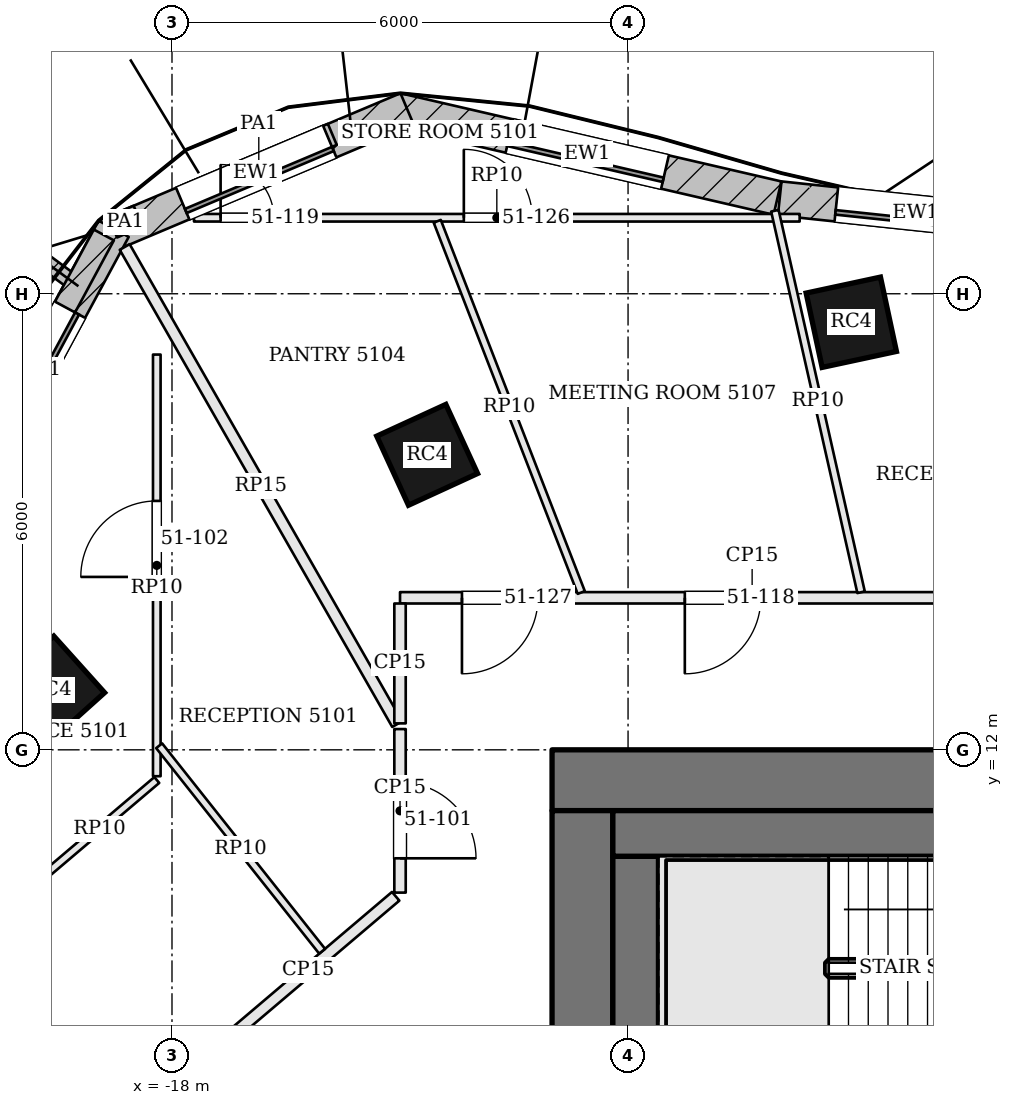
"""IFC4 building model, lengths in metres.
Left out: names, types, materials, properties, quantities, classifications, styles, units other than length and angle.
Written with IfcOpenShell. Run it as: python <this file> out.ifc"""

import sys

from ifc_helpers import new_model, si_unit, direction, frame, frame_2d, origin, origin_2d, place, context, subcontext, project, spatial, rectangle, extrude, element, fill, save


model = new_model("IFC4")
c1 = context("Model", 3, precision=1e-05, world=origin(), true_north=direction((0.0, 1.0)))
c2 = subcontext(c1, "Body", "Model", "MODEL_VIEW")
j1 = project(units=[si_unit("LENGTHUNIT", "METRE"), si_unit("PLANEANGLEUNIT", "RADIAN")], contexts=[c1])
p1 = place(None, origin())
s1 = spatial("IfcSite", under=j1, at=p1, CompositionType="ELEMENT")
p2 = place(p1, origin())
s2 = spatial("IfcBuilding", under=s1, at=p2, CompositionType="ELEMENT")
p3 = place(p2, frame((0.0, 0.0, 209.1)))
s3 = spatial("IfcBuildingStorey", under=s2, at=p3, CompositionType="ELEMENT", Elevation=209.1)
p4 = place(p3, frame((-13.0, 11.6, 0.0), z_axis=(0.0, 0.0, 1.0), x_axis=(1.0, 0.0, 0.0)))
e1 = element("IfcWall", 1, at=p4, inside=s3, PredefinedType="SHEAR", context=c2, shape_type="SweptSolid", body=[
    extrude(rectangle(XDim=26.0, YDim=0.8, at=frame_2d((13.0, 0.0))), origin(), (0.0, 0.0, 1.0), 3.9),
])
p5 = place(p4, frame((9.375, 0.0, 0.0)))
e2 = element("IfcOpeningElement", 2, at=p5, cuts=e1, PredefinedType="OPENING", context=c2, shape_type="SweptSolid", body=[
    extrude(rectangle(XDim=0.7, YDim=2.1, at=frame_2d((0.35, 1.05))), frame((0.0, 0.41, 0.0), z_axis=(0.0, -1.0, 0.0), x_axis=(1.0, 0.0, 0.0)), (0.0, 0.0, 1.0), 0.82),
])
p6 = place(p4, frame((12.075, 0.0, 0.0)))
e3 = element("IfcOpeningElement", 3, at=p6, cuts=e1, PredefinedType="OPENING", context=c2, shape_type="SweptSolid", body=[
    extrude(rectangle(XDim=1.0, YDim=2.1, at=frame_2d((0.5, 1.05))), frame((0.0, 0.41, 0.0), z_axis=(0.0, -1.0, 0.0), x_axis=(1.0, 0.0, 0.0)), (0.0, 0.0, 1.0), 0.82),
])
p7 = place(p4, frame((14.675, 0.0, 0.0)))
e4 = element("IfcOpeningElement", 4, at=p7, cuts=e1, PredefinedType="OPENING", context=c2, shape_type="SweptSolid", body=[
    extrude(rectangle(XDim=0.7, YDim=2.1, at=frame_2d((0.35, 1.05))), frame((0.0, 0.41, 0.0), z_axis=(0.0, -1.0, 0.0), x_axis=(1.0, 0.0, 0.0)), (0.0, 0.0, 1.0), 0.82),
])
p8 = place(p4, frame((16.625, 0.0, 0.0)))
e5 = element("IfcOpeningElement", 5, at=p8, cuts=e1, PredefinedType="OPENING", context=c2, shape_type="SweptSolid", body=[
    extrude(rectangle(XDim=0.9, YDim=2.1, at=frame_2d((0.45, 1.05))), frame((0.0, 0.41, 0.0), z_axis=(0.0, -1.0, 0.0), x_axis=(1.0, 0.0, 0.0)), (0.0, 0.0, 1.0), 0.82),
])
p9 = place(p3, frame((-12.6, -2.2, 0.0), z_axis=(0.0, 0.0, 1.0), x_axis=(0.0, 1.0, 0.0)))
e6 = element("IfcWall", 6, at=p9, inside=s3, PredefinedType="SHEAR", context=c2, shape_type="SweptSolid", body=[
    extrude(rectangle(XDim=13.4, YDim=0.8, at=frame_2d((6.7, 0.0))), origin(), (0.0, 0.0, 1.0), 3.9),
])
p10 = place(p9, frame((4.2, 0.0, 0.0)))
e7 = element("IfcOpeningElement", 7, at=p10, cuts=e6, PredefinedType="OPENING", context=c2, shape_type="SweptSolid", body=[
    extrude(rectangle(XDim=1.8, YDim=2.1, at=frame_2d((0.9, 1.05))), frame((0.0, 0.41, 0.0), z_axis=(0.0, -1.0, 0.0), x_axis=(1.0, 0.0, 0.0)), (0.0, 0.0, 1.0), 0.82),
])
for number, where, z_axis, x_axis in (
    (8, (-9.063, 17.625, 0.0), (0.0, 0.0, 1.0), (-0.978, -0.21, 0.0)),
    (9, (-14.643, 15.881, 0.0), (0.0, 0.0, 1.0), (-0.909, -0.417, 0.0)),
    (10, (-19.593, 12.79, 0.0), (0.0, 0.0, 1.0), (-0.744, -0.668, 0.0)),
):
    element("IfcColumn", number, at=place(p3, frame(where, z_axis=z_axis, x_axis=x_axis)), inside=s3, PredefinedType="COLUMN", context=c2, shape_type="SweptSolid", body=[
        extrude(rectangle(XDim=1.0, YDim=1.0, at=origin_2d()), origin(), (0.0, 0.0, 1.0), 3.9),
    ])
p11 = place(p3, frame((-6.427, 18.875, 0.0), z_axis=(0.0, 0.0, 1.0), x_axis=(-0.994433468803, 0.10536638992, 0.0)))
e11 = element("IfcWall", 11, at=p11, inside=s3, PredefinedType="SOLIDWALL", context=c2, shape_type="SweptSolid", body=[
    extrude(rectangle(XDim=3.598, YDim=0.45, at=frame_2d((1.799, 0.0))), origin(), (0.0, 0.0, 1.0), 3.7),
])
p12 = place(p11, frame((0.749, 0.0, 0.9)))
e12 = element("IfcOpeningElement", 12, at=p12, cuts=e11, PredefinedType="OPENING", context=c2, shape_type="SweptSolid", body=[
    extrude(rectangle(XDim=2.1, YDim=2.3, at=frame_2d((1.05, 1.15))), frame((0.0, 0.235, 0.0), z_axis=(0.0, -1.0, 0.0), x_axis=(1.0, 0.0, 0.0)), (0.0, 0.0, 1.0), 0.47),
])
p13 = place(p3, frame((-10.034, 19.259, 0.0), z_axis=(0.0, 0.0, 1.0), x_axis=(-0.974223567844, 0.225584662283, 0.0)))
e13 = element("IfcWall", 13, at=p13, inside=s3, PredefinedType="SOLIDWALL", context=c2, shape_type="SweptSolid", body=[
    extrude(rectangle(XDim=5.139, YDim=0.45, at=frame_2d((2.569, 0.0))), origin(), (0.0, 0.0, 1.0), 3.7),
])
p14 = place(p13, frame((1.519, 0.0, 0.9)))
e14 = element("IfcOpeningElement", 14, at=p14, cuts=e13, PredefinedType="OPENING", context=c2, shape_type="SweptSolid", body=[
    extrude(rectangle(XDim=2.1, YDim=2.3, at=frame_2d((1.05, 1.15))), frame((0.0, 0.235, 0.0), z_axis=(0.0, -1.0, 0.0), x_axis=(1.0, 0.0, 0.0)), (0.0, 0.0, 1.0), 0.47),
])
p15 = place(p3, frame((-14.906, 20.431, 0.0), z_axis=(0.0, 0.0, 1.0), x_axis=(-0.921435803521, -0.388530642279, 0.0)))
e15 = element("IfcWall", 15, at=p15, inside=s3, PredefinedType="SOLIDWALL", context=c2, shape_type="SweptSolid", body=[
    extrude(rectangle(XDim=4.309, YDim=0.45, at=frame_2d((2.154, 0.0))), origin(), (0.0, 0.0, 1.0), 3.7),
])
p16 = place(p15, frame((1.104, 0.0, 0.9)))
e16 = element("IfcOpeningElement", 16, at=p16, cuts=e15, PredefinedType="OPENING", context=c2, shape_type="SweptSolid", body=[
    extrude(rectangle(XDim=2.1, YDim=2.3, at=frame_2d((1.05, 1.15))), frame((0.0, 0.235, 0.0), z_axis=(0.0, -1.0, 0.0), x_axis=(1.0, 0.0, 0.0)), (0.0, 0.0, 1.0), 0.47),
])
p17 = place(p3, frame((-18.767, 18.854, 0.0), z_axis=(0.0, 0.0, 1.0), x_axis=(-0.474475888716, -0.880268499395, 0.0)))
e17 = element("IfcWall", 17, at=p17, inside=s3, PredefinedType="SOLIDWALL", context=c2, shape_type="SweptSolid", body=[
    extrude(rectangle(XDim=4.219, YDim=0.45, at=frame_2d((2.11, 0.0))), origin(), (0.0, 0.0, 1.0), 3.7),
])
p18 = place(p17, frame((1.21, 0.0, 0.9)))
e18 = element("IfcOpeningElement", 18, at=p18, cuts=e17, PredefinedType="OPENING", context=c2, shape_type="SweptSolid", body=[
    extrude(rectangle(XDim=1.8, YDim=2.3, at=frame_2d((0.9, 1.15))), frame((0.0, 0.235, 0.0), z_axis=(0.0, -1.0, 0.0), x_axis=(1.0, 0.0, 0.0)), (0.0, 0.0, 1.0), 0.47),
])
p19 = place(p3, frame((-19.231, 18.099, 0.0), z_axis=(0.0, 0.0, 1.0), x_axis=(-0.806085538754, 0.591799040394, 0.0)))
e19 = element("IfcWall", 19, at=p19, inside=s3, PredefinedType="SOLIDWALL", context=c2, shape_type="SweptSolid", body=[
    extrude(rectangle(XDim=1.75, YDim=0.2, at=frame_2d((0.875, 0.0))), origin(), (0.0, 0.0, 1.0), 3.7),
])
p20 = place(p3, frame((-15.891, 20.097, 3.9), z_axis=(0.0, 0.0, 1.0), x_axis=(-0.921468908678, -0.388452121038, 0.0)))
e20 = element("IfcWall", 20, at=p20, inside=s3, PredefinedType="PARAPET", context=c2, shape_type="SweptSolid", body=[
    extrude(rectangle(XDim=2.099, YDim=0.3, at=frame_2d((1.05, 0.0))), origin(), (0.0, 0.0, 1.0), 1.1),
])
p21 = place(p3, frame((-18.446, 19.02, 3.9), z_axis=(0.0, 0.0, 1.0), x_axis=(-0.921356634102, -0.388718346358, 0.0)))
e21 = element("IfcWall", 21, at=p21, inside=s3, PredefinedType="PARAPET", context=c2, shape_type="SweptSolid", body=[
    extrude(rectangle(XDim=0.363, YDim=0.3, at=frame_2d((0.182, 0.0))), origin(), (0.0, 0.0, 1.0), 1.1),
])
p22 = place(p3, frame((-18.896, 18.773, 3.9), z_axis=(0.0, 0.0, 1.0), x_axis=(-0.474444905835, -0.880285198857, 0.0)))
e22 = element("IfcWall", 22, at=p22, inside=s3, PredefinedType="PARAPET", context=c2, shape_type="SweptSolid", body=[
    extrude(rectangle(XDim=4.05, YDim=0.3, at=frame_2d((2.025, 0.0))), origin(), (0.0, 0.0, 1.0), 1.1),
])
p23 = place(p3, frame((-11.9, 7.65, 0.0), z_axis=(0.0, 0.0, 1.0), x_axis=(0.0, 1.0, 0.0)))
e23 = element("IfcWall", 23, at=p23, inside=s3, PredefinedType="SOLIDWALL", context=c2, shape_type="SweptSolid", body=[
    extrude(rectangle(XDim=2.95, YDim=0.6, at=frame_2d((1.475, 0.0))), origin(), (0.0, 0.0, 1.0), 3.7),
])
p24 = place(p3, frame((-12.2, 10.9, 0.0), z_axis=(0.0, 0.0, 1.0), x_axis=(1.0, 0.0, 0.0)))
e24 = element("IfcWall", 24, at=p24, inside=s3, PredefinedType="SOLIDWALL", context=c2, shape_type="SweptSolid", body=[
    extrude(rectangle(XDim=7.1, YDim=0.6, at=frame_2d((3.55, 0.0))), origin(), (0.0, 0.0, 1.0), 3.7),
])
p25 = place(p3, frame((-15.0, 12.273, 0.0), z_axis=(0.0, 0.0, 1.0), x_axis=(0.0, -1.0, 0.0)))
e25 = element("IfcWall", 25, at=p25, inside=s3, PredefinedType="PARTITIONING", context=c2, shape_type="SweptSolid", body=[
    extrude(rectangle(XDim=2.151, YDim=0.15, at=frame_2d((1.076, 0.0))), origin(), (0.0, 0.0, 1.0), 3.084),
])
p26 = place(p25, frame((0.7, 0.0, 0.0)))
e26 = element("IfcOpeningElement", 26, at=p26, cuts=e25, PredefinedType="OPENING", context=c2, shape_type="SweptSolid", body=[
    extrude(rectangle(XDim=1.0, YDim=2.1, at=frame_2d((0.5, 1.05))), frame((0.0, 0.085, 0.0), z_axis=(0.0, -1.0, 0.0), x_axis=(1.0, 0.0, 0.0)), (0.0, 0.0, 1.0), 0.17),
])
p27 = place(p3, frame((-15.057, 10.073, 0.0), z_axis=(0.0, 0.0, 1.0), x_axis=(-0.762398905861, -0.647107339119, 0.0)))
e27 = element("IfcWall", 27, at=p27, inside=s3, PredefinedType="PARTITIONING", context=c2, shape_type="SweptSolid", body=[
    extrude(rectangle(XDim=3.013, YDim=0.15, at=frame_2d((1.507, 0.0))), origin(), (0.0, 0.0, 1.0), 3.084),
])
p28 = place(p3, frame((-18.622, 18.615, 0.0), z_axis=(0.0, 0.0, 1.0), x_axis=(0.495931620355, -0.868361576725, 0.0)))
e28 = element("IfcWall", 28, at=p28, inside=s3, PredefinedType="PARTITIONING", context=c2, shape_type="SweptSolid", body=[
    extrude(rectangle(XDim=7.229, YDim=0.15, at=frame_2d((3.615, 0.0))), origin(), (0.0, 0.0, 1.0), 3.084),
])
p29 = place(p3, frame((-5.735, 14.0, 0.0), z_axis=(0.0, 0.0, 1.0), x_axis=(-1.0, 0.0, 0.0)))
e29 = element("IfcWall", 29, at=p29, inside=s3, PredefinedType="PARTITIONING", context=c2, shape_type="SweptSolid", body=[
    extrude(rectangle(XDim=9.265, YDim=0.15, at=frame_2d((4.632, 0.0))), origin(), (0.0, 0.0, 1.0), 3.084),
])
p30 = place(p29, frame((1.054, 0.0, 0.0)))
e30 = element("IfcOpeningElement", 30, at=p30, cuts=e29, PredefinedType="OPENING", context=c2, shape_type="SweptSolid", body=[
    extrude(rectangle(XDim=1.0, YDim=2.1, at=frame_2d((0.5, 1.05))), frame((0.0, 0.085, 0.0), z_axis=(0.0, -1.0, 0.0), x_axis=(1.0, 0.0, 0.0)), (0.0, 0.0, 1.0), 0.17),
])
p31 = place(p29, frame((4.518, 0.0, 0.0)))
e31 = element("IfcOpeningElement", 31, at=p31, cuts=e29, PredefinedType="OPENING", context=c2, shape_type="SweptSolid", body=[
    extrude(rectangle(XDim=1.0, YDim=2.4, at=frame_2d((0.5, 1.2))), frame((0.0, 0.085, 0.0), z_axis=(0.0, -1.0, 0.0), x_axis=(1.0, 0.0, 0.0)), (0.0, 0.0, 1.0), 0.17),
])
p32 = place(p29, frame((7.45, 0.0, 0.0)))
e32 = element("IfcOpeningElement", 32, at=p32, cuts=e29, PredefinedType="OPENING", context=c2, shape_type="SweptSolid", body=[
    extrude(rectangle(XDim=1.0, YDim=2.1, at=frame_2d((0.5, 1.05))), frame((0.0, 0.085, 0.0), z_axis=(0.0, -1.0, 0.0), x_axis=(1.0, 0.0, 0.0)), (0.0, 0.0, 1.0), 0.17),
])
p33 = place(p3, frame((-15.0, 13.925, 0.0), z_axis=(0.0, 0.0, 1.0), x_axis=(0.0, -1.0, 0.0)))
e33 = element("IfcWall", 33, at=p33, inside=s3, PredefinedType="PARTITIONING", context=c2, shape_type="SweptSolid", body=[
    extrude(rectangle(XDim=1.577, YDim=0.15, at=frame_2d((0.789, 0.0))), origin(), (0.0, 0.0, 1.0), 3.084),
])
p34 = place(p3, frame((-19.704, 10.326, 0.0), z_axis=(0.0, 0.0, 1.0), x_axis=(0.762375886238, 0.647134459044, 0.0)))
e34 = element("IfcWall", 34, at=p34, inside=s3, PredefinedType="PARTITIONING", context=c2, shape_type="SweptSolid", body=[
    extrude(rectangle(XDim=1.972, YDim=0.1, at=frame_2d((0.986, 0.0))), origin(), (0.0, 0.0, 1.0), 3.084),
])
p35 = place(p3, frame((-18.2, 11.653, 0.0), z_axis=(0.0, 0.0, 1.0), x_axis=(0.0, 1.0, 0.0)))
e35 = element("IfcWall", 35, at=p35, inside=s3, PredefinedType="PARTITIONING", context=c2, shape_type="SweptSolid", body=[
    extrude(rectangle(XDim=5.547, YDim=0.1, at=frame_2d((2.774, 0.0))), origin(), (0.0, 0.0, 1.0), 3.084),
])
p36 = place(p35, frame((2.622, 0.0, 0.0)))
e36 = element("IfcOpeningElement", 36, at=p36, cuts=e35, PredefinedType="OPENING", context=c2, shape_type="SweptSolid", body=[
    extrude(rectangle(XDim=1.0, YDim=2.1, at=frame_2d((0.5, 1.05))), frame((0.0, 0.06, 0.0), z_axis=(0.0, -1.0, 0.0), x_axis=(1.0, 0.0, 0.0)), (0.0, 0.0, 1.0), 0.12),
])
p37 = place(p3, frame((-16.025, 9.35, 0.0), z_axis=(0.0, 0.0, 1.0), x_axis=(-0.621358765416, 0.783526186315, 0.0)))
e37 = element("IfcWall", 37, at=p37, inside=s3, PredefinedType="PARTITIONING", context=c2, shape_type="SweptSolid", body=[
    extrude(rectangle(XDim=3.451, YDim=0.1, at=frame_2d((1.725, 0.0))), origin(), (0.0, 0.0, 1.0), 3.084),
])
p38 = place(p3, frame((-17.71, 19.0, 0.0), z_axis=(0.0, 0.0, 1.0), x_axis=(1.0, 0.0, 0.0)))
e38 = element("IfcWall", 38, at=p38, inside=s3, PredefinedType="PARTITIONING", context=c2, shape_type="SweptSolid", body=[
    extrude(rectangle(XDim=7.968, YDim=0.1, at=frame_2d((3.984, 0.0))), origin(), (0.0, 0.0, 1.0), 3.084),
])
p39 = place(p38, frame((0.35, 0.0, 0.0)))
e39 = element("IfcOpeningElement", 39, at=p39, cuts=e38, PredefinedType="OPENING", context=c2, shape_type="SweptSolid", body=[
    extrude(rectangle(XDim=0.7, YDim=2.1, at=frame_2d((0.35, 1.05))), frame((0.0, 0.06, 0.0), z_axis=(0.0, -1.0, 0.0), x_axis=(1.0, 0.0, 0.0)), (0.0, 0.0, 1.0), 0.12),
])
p40 = place(p38, frame((3.55, 0.0, 0.0)))
e40 = element("IfcOpeningElement", 40, at=p40, cuts=e38, PredefinedType="OPENING", context=c2, shape_type="SweptSolid", body=[
    extrude(rectangle(XDim=0.9, YDim=2.1, at=frame_2d((0.45, 1.05))), frame((0.0, 0.06, 0.0), z_axis=(0.0, -1.0, 0.0), x_axis=(1.0, 0.0, 0.0)), (0.0, 0.0, 1.0), 0.12),
])
p41 = place(p3, frame((-8.934, 14.073, 0.0), z_axis=(0.0, 0.0, 1.0), x_axis=(-0.22039047917, 0.975411726755, 0.0)))
e41 = element("IfcWall", 41, at=p41, inside=s3, PredefinedType="PARTITIONING", context=c2, shape_type="SweptSolid", body=[
    extrude(rectangle(XDim=5.146, YDim=0.1, at=frame_2d((2.573, 0.0))), origin(), (0.0, 0.0, 1.0), 3.084),
])
p42 = place(p3, frame((-12.615, 14.07, 0.0), z_axis=(0.0, 0.0, 1.0), x_axis=(-0.361760184265, 0.932271188593, 0.0)))
e42 = element("IfcWall", 42, at=p42, inside=s3, PredefinedType="PARTITIONING", context=c2, shape_type="SweptSolid", body=[
    extrude(rectangle(XDim=5.238, YDim=0.1, at=frame_2d((2.619, 0.0))), origin(), (0.0, 0.0, 1.0), 3.084),
])
p43 = place(p12, origin())
e43 = element("IfcWindow", 43, at=p43, inside=s3, PartitioningType="SINGLE_PANEL", PredefinedType="WINDOW", context=c2, shape_type="SweptSolid", body=[
    extrude(rectangle(XDim=2.1, YDim=2.3, at=frame_2d((1.05, 1.15))), frame((0.0, 0.135, 0.0), z_axis=(0.0, -1.0, 0.0), x_axis=(1.0, 0.0, 0.0)), (0.0, 0.0, 1.0), 0.06),
])
fill(e12, e43)
p44 = place(p14, origin())
e44 = element("IfcWindow", 44, at=p44, inside=s3, PartitioningType="SINGLE_PANEL", PredefinedType="WINDOW", context=c2, shape_type="SweptSolid", body=[
    extrude(rectangle(XDim=2.1, YDim=2.3, at=frame_2d((1.05, 1.15))), frame((0.0, 0.135, 0.0), z_axis=(0.0, -1.0, 0.0), x_axis=(1.0, 0.0, 0.0)), (0.0, 0.0, 1.0), 0.06),
])
fill(e14, e44)
p45 = place(p16, origin())
e45 = element("IfcWindow", 45, at=p45, inside=s3, PartitioningType="SINGLE_PANEL", PredefinedType="WINDOW", context=c2, shape_type="SweptSolid", body=[
    extrude(rectangle(XDim=2.1, YDim=2.3, at=frame_2d((1.05, 1.15))), frame((0.0, 0.135, 0.0), z_axis=(0.0, -1.0, 0.0), x_axis=(1.0, 0.0, 0.0)), (0.0, 0.0, 1.0), 0.06),
])
fill(e16, e45)
p46 = place(p18, origin())
e46 = element("IfcWindow", 46, at=p46, inside=s3, PartitioningType="SINGLE_PANEL", PredefinedType="WINDOW", context=c2, shape_type="SweptSolid", body=[
    extrude(rectangle(XDim=1.8, YDim=2.3, at=frame_2d((0.9, 1.15))), frame((0.0, 0.135, 0.0), z_axis=(0.0, -1.0, 0.0), x_axis=(1.0, 0.0, 0.0)), (0.0, 0.0, 1.0), 0.06),
])
fill(e18, e46)
p47 = place(p26, origin())
e47 = element("IfcDoor", 47, at=p47, inside=s3, OperationType="SINGLE_SWING_RIGHT", PredefinedType="DOOR", context=c2, shape_type="SweptSolid", body=[
    extrude(rectangle(XDim=1.0, YDim=2.1, at=frame_2d((0.5, 1.05))), frame((0.0, 0.025, 0.0), z_axis=(0.0, -1.0, 0.0), x_axis=(1.0, 0.0, 0.0)), (0.0, 0.0, 1.0), 0.05),
])
fill(e26, e47)
p48 = place(p36, origin())
e48 = element("IfcDoor", 48, at=p48, inside=s3, OperationType="SINGLE_SWING_LEFT", PredefinedType="DOOR", context=c2, shape_type="SweptSolid", body=[
    extrude(rectangle(XDim=1.0, YDim=2.1, at=frame_2d((0.5, 1.05))), frame((0.0, 0.025, 0.0), z_axis=(0.0, -1.0, 0.0), x_axis=(1.0, 0.0, 0.0)), (0.0, 0.0, 1.0), 0.05),
])
fill(e36, e48)
p49 = place(p31, origin())
e49 = element("IfcDoor", 49, at=p49, inside=s3, OperationType="SINGLE_SWING_RIGHT", PredefinedType="DOOR", context=c2, shape_type="SweptSolid", body=[
    extrude(rectangle(XDim=1.0, YDim=2.4, at=frame_2d((0.5, 1.2))), frame((0.0, 0.025, 0.0), z_axis=(0.0, -1.0, 0.0), x_axis=(1.0, 0.0, 0.0)), (0.0, 0.0, 1.0), 0.05),
])
fill(e31, e49)
p50 = place(p39, origin())
e50 = element("IfcDoor", 50, at=p50, inside=s3, OperationType="SINGLE_SWING_LEFT", PredefinedType="DOOR", context=c2, shape_type="SweptSolid", body=[
    extrude(rectangle(XDim=0.7, YDim=2.1, at=frame_2d((0.35, 1.05))), frame((0.0, 0.025, 0.0), z_axis=(0.0, -1.0, 0.0), x_axis=(1.0, 0.0, 0.0)), (0.0, 0.0, 1.0), 0.05),
])
fill(e39, e50)
p51 = place(p40, origin())
e51 = element("IfcDoor", 51, at=p51, inside=s3, OperationType="SINGLE_SWING_LEFT", PredefinedType="DOOR", context=c2, shape_type="SweptSolid", body=[
    extrude(rectangle(XDim=0.9, YDim=2.1, at=frame_2d((0.45, 1.05))), frame((0.0, 0.025, 0.0), z_axis=(0.0, -1.0, 0.0), x_axis=(1.0, 0.0, 0.0)), (0.0, 0.0, 1.0), 0.05),
])
fill(e40, e51)
p52 = place(p32, origin())
e52 = element("IfcDoor", 52, at=p52, inside=s3, OperationType="SINGLE_SWING_RIGHT", PredefinedType="DOOR", context=c2, shape_type="SweptSolid", body=[
    extrude(rectangle(XDim=1.0, YDim=2.1, at=frame_2d((0.5, 1.05))), frame((0.0, 0.025, 0.0), z_axis=(0.0, -1.0, 0.0), x_axis=(1.0, 0.0, 0.0)), (0.0, 0.0, 1.0), 0.05),
])
fill(e32, e52)
save(model, sys.argv[1])
